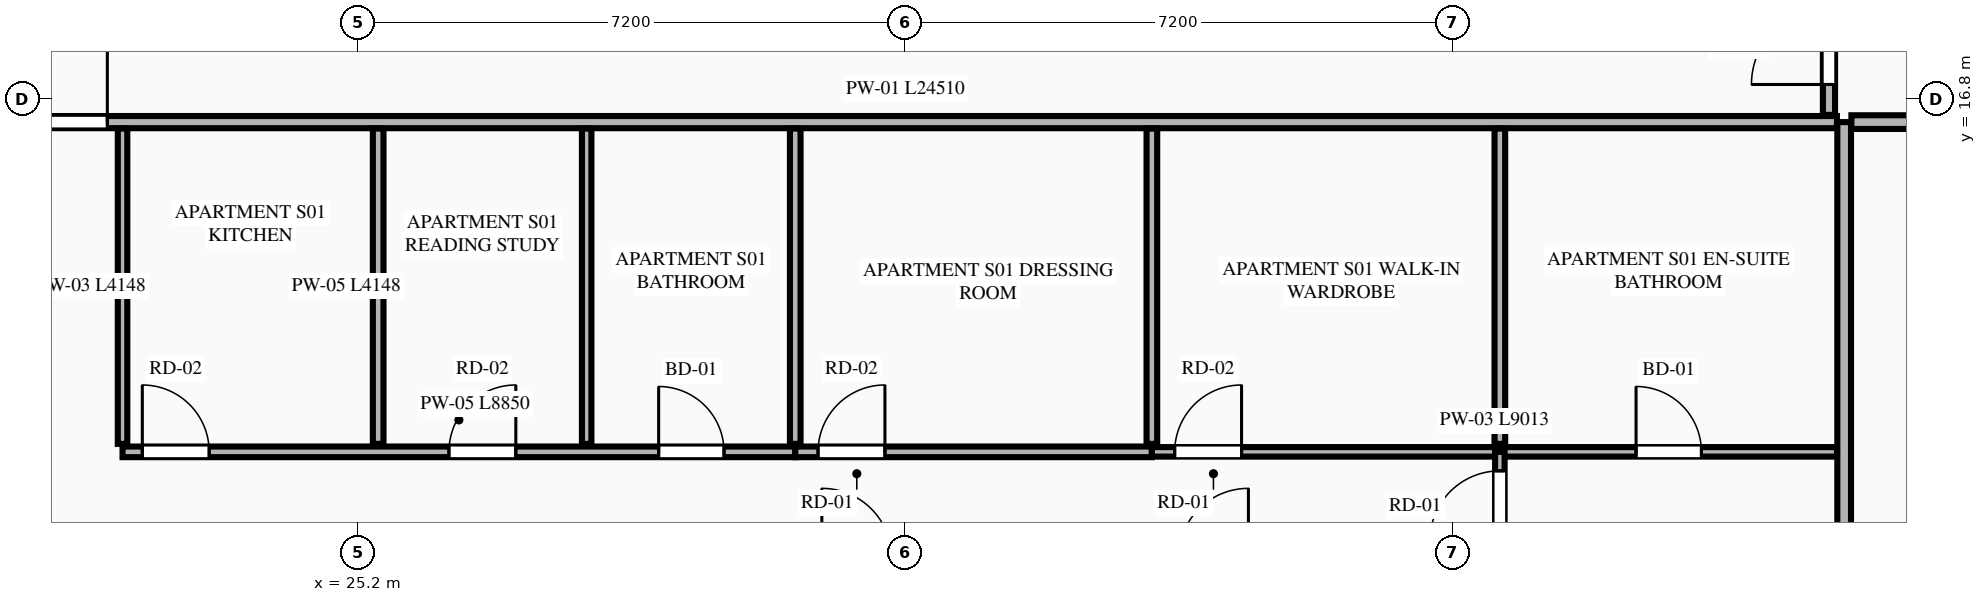
"""IFC4 building model, lengths in metres.
Left out: names, types, materials, properties, quantities, classifications, styles, units other than length and angle.
Written with IfcOpenShell. Run it as: python <this file> out.ifc"""

import sys

from ifc_helpers import new_model, si_unit, direction, frame, frame_2d, origin, place, context, subcontext, project, spatial, rectangle, extrude, element, fill, save


model = new_model("IFC4")
c1 = context("Model", 3, precision=1e-05, world=origin(), true_north=direction((0.0, 1.0)))
c2 = subcontext(c1, "Body", "Model", "MODEL_VIEW")
j1 = project(units=[si_unit("LENGTHUNIT", "METRE"), si_unit("PLANEANGLEUNIT", "RADIAN")], contexts=[c1])
p1 = place(None, origin())
s1 = spatial("IfcSite", under=j1, at=p1, CompositionType="ELEMENT")
p2 = place(p1, origin())
s2 = spatial("IfcBuilding", under=s1, at=p2, CompositionType="ELEMENT")
p3 = place(p2, frame((0.0, 0.0, 141.0)))
s3 = spatial("IfcBuildingStorey", under=s2, at=p3, CompositionType="ELEMENT", Elevation=141.0)
p4 = place(p3, frame((44.75, 4.105, 0.0), z_axis=(0.0, 0.0, 1.0), x_axis=(0.0, 1.0, 0.0)))
e1 = element("IfcWall", 1, at=p4, inside=s3, PredefinedType="PARTITIONING", context=c2, shape_type="SweptSolid", body=[
    extrude(rectangle(XDim=12.395, YDim=0.18, at=frame_2d((6.198, 0.0))), origin(), (0.0, 0.0, 1.0), 3.34),
])
p5 = place(p3, frame((20.145, 16.5, 0.0), z_axis=(0.0, 0.0, 1.0), x_axis=(1.0, 0.0, 0.0)))
e2 = element("IfcWall", 2, at=p5, inside=s3, PredefinedType="PARTITIONING", context=c2, shape_type="SweptSolid", body=[
    extrude(rectangle(XDim=24.51, YDim=0.16, at=frame_2d((12.255, 0.0))), origin(), (0.0, 0.0, 1.0), 3.34),
])
p6 = place(p5, frame((0.405, 0.0, 0.0)))
e3 = element("IfcOpeningElement", 3, at=p6, cuts=e2, PredefinedType="OPENING", context=c2, shape_type="SweptSolid", body=[
    extrude(rectangle(XDim=1.35, YDim=2.35, at=frame_2d((0.675, 1.175))), frame((0.0, 0.09, 0.0), z_axis=(0.0, -1.0, 0.0), x_axis=(1.0, 0.0, 0.0)), (0.0, 0.0, 1.0), 0.18),
])
p7 = place(p3, frame((22.1, 12.267, 0.0), z_axis=(0.0, 0.0, 1.0), x_axis=(0.0, 1.0, 0.0)))
e4 = element("IfcWall", 4, at=p7, inside=s3, PredefinedType="PARTITIONING", context=c2, shape_type="SweptSolid", body=[
    extrude(rectangle(XDim=4.148, YDim=0.125, at=frame_2d((2.074, 0.0))), origin(), (0.0, 0.0, 1.0), 2.722),
])
p8 = place(p3, frame((22.1, 12.162, 0.0), z_axis=(0.0, 0.0, 1.0), x_axis=(1.0, 0.0, 0.0)))
e5 = element("IfcWall", 5, at=p8, inside=s3, PredefinedType="PLUMBINGWALL", context=c2, shape_type="SweptSolid", body=[
    extrude(rectangle(XDim=8.85, YDim=0.14, at=frame_2d((4.425, 0.0))), origin(), (0.0, 0.0, 1.0), 3.34),
])
p9 = place(p8, frame((7.053, 0.0, 0.0)))
e6 = element("IfcOpeningElement", 6, at=p9, cuts=e5, PredefinedType="OPENING", context=c2, shape_type="SweptSolid", body=[
    extrude(rectangle(XDim=0.86, YDim=2.1, at=frame_2d((0.43, 1.05))), frame((0.0, 0.08, 0.0), z_axis=(0.0, -1.0, 0.0), x_axis=(1.0, 0.0, 0.0)), (0.0, 0.0, 1.0), 0.16),
])
p10 = place(p8, frame((0.26, 0.0, 0.0)))
e7 = element("IfcOpeningElement", 7, at=p10, cuts=e5, PredefinedType="OPENING", context=c2, shape_type="SweptSolid", body=[
    extrude(rectangle(XDim=0.88, YDim=2.15, at=frame_2d((0.44, 1.075))), frame((0.0, 0.08, 0.0), z_axis=(0.0, -1.0, 0.0), x_axis=(1.0, 0.0, 0.0)), (0.0, 0.0, 1.0), 0.16),
])
p11 = place(p8, frame((4.294, 0.0, 0.0)))
e8 = element("IfcOpeningElement", 8, at=p11, cuts=e5, PredefinedType="OPENING", context=c2, shape_type="SweptSolid", body=[
    extrude(rectangle(XDim=0.88, YDim=2.15, at=frame_2d((0.44, 1.075))), frame((0.0, 0.08, 0.0), z_axis=(0.0, -1.0, 0.0), x_axis=(1.0, 0.0, 0.0)), (0.0, 0.0, 1.0), 0.16),
])
p12 = place(p3, frame((30.95, 12.162, 0.0), z_axis=(0.0, 0.0, 1.0), x_axis=(1.0, 0.0, 0.0)))
e9 = element("IfcWall", 9, at=p12, inside=s3, PredefinedType="PLUMBINGWALL", context=c2, shape_type="SweptSolid", body=[
    extrude(rectangle(XDim=4.692, YDim=0.14, at=frame_2d((2.346, 0.0))), origin(), (0.0, 0.0, 1.0), 3.34),
])
p13 = place(p12, frame((0.3, 0.0, 0.0)))
e10 = element("IfcOpeningElement", 10, at=p13, cuts=e9, PredefinedType="OPENING", context=c2, shape_type="SweptSolid", body=[
    extrude(rectangle(XDim=0.88, YDim=2.15, at=frame_2d((0.44, 1.075))), frame((0.0, 0.08, 0.0), z_axis=(0.0, -1.0, 0.0), x_axis=(1.0, 0.0, 0.0)), (0.0, 0.0, 1.0), 0.16),
])
p14 = place(p3, frame((35.642, 12.162, 0.0), z_axis=(0.0, 0.0, 1.0), x_axis=(1.0, 0.0, 0.0)))
e11 = element("IfcWall", 11, at=p14, inside=s3, PredefinedType="PARTITIONING", context=c2, shape_type="SweptSolid", body=[
    extrude(rectangle(XDim=9.013, YDim=0.125, at=frame_2d((4.506, 0.0))), origin(), (0.0, 0.0, 1.0), 3.34),
])
p15 = place(p14, frame((6.37, 0.0, 0.0)))
e12 = element("IfcOpeningElement", 12, at=p15, cuts=e11, PredefinedType="OPENING", context=c2, shape_type="SweptSolid", body=[
    extrude(rectangle(XDim=0.86, YDim=2.1, at=frame_2d((0.43, 1.05))), frame((0.0, 0.073, 0.0), z_axis=(0.0, -1.0, 0.0), x_axis=(1.0, 0.0, 0.0)), (0.0, 0.0, 1.0), 0.145),
])
p16 = place(p14, frame((0.3, 0.0, 0.0)))
e13 = element("IfcOpeningElement", 13, at=p16, cuts=e11, PredefinedType="OPENING", context=c2, shape_type="SweptSolid", body=[
    extrude(rectangle(XDim=0.88, YDim=2.15, at=frame_2d((0.44, 1.075))), frame((0.0, 0.073, 0.0), z_axis=(0.0, -1.0, 0.0), x_axis=(1.0, 0.0, 0.0)), (0.0, 0.0, 1.0), 0.145),
])
p17 = place(p3, frame((25.463, 12.267, 0.0), z_axis=(0.0, 0.0, 1.0), x_axis=(0.0, 1.0, 0.0)))
e14 = element("IfcWall", 14, at=p17, inside=s3, PredefinedType="PLUMBINGWALL", context=c2, shape_type="SweptSolid", body=[
    extrude(rectangle(XDim=4.148, YDim=0.14, at=frame_2d((2.074, 0.0))), origin(), (0.0, 0.0, 1.0), 3.34),
])
p18 = place(p3, frame((28.206, 12.267, 0.0), z_axis=(0.0, 0.0, 1.0), x_axis=(0.0, 1.0, 0.0)))
e15 = element("IfcWall", 15, at=p18, inside=s3, PredefinedType="PARTITIONING", context=c2, shape_type="SweptSolid", body=[
    extrude(rectangle(XDim=4.148, YDim=0.125, at=frame_2d((2.074, 0.0))), origin(), (0.0, 0.0, 1.0), 3.34),
])
p19 = place(p3, frame((40.22, 10.832, 0.0), z_axis=(0.0, 0.0, 1.0), x_axis=(0.0, 1.0, 0.0)))
e16 = element("IfcWall", 16, at=p19, inside=s3, PredefinedType="PARTITIONING", context=c2, shape_type="SweptSolid", body=[
    extrude(rectangle(XDim=1.33, YDim=0.125, at=frame_2d((0.665, 0.0))), origin(), (0.0, 0.0, 1.0), 3.34),
])
p20 = place(p19, frame((0.16, 0.0, 0.0)))
e17 = element("IfcOpeningElement", 17, at=p20, cuts=e16, PredefinedType="OPENING", context=c2, shape_type="SweptSolid", body=[
    extrude(rectangle(XDim=0.92, YDim=2.15, at=frame_2d((0.46, 1.075))), frame((0.0, 0.073, 0.0), z_axis=(0.0, -1.0, 0.0), x_axis=(1.0, 0.0, 0.0)), (0.0, 0.0, 1.0), 0.145),
])
for number, where, z_axis, x_axis in (
    (18, (30.95, 12.267, 0.0), (0.0, 0.0, 1.0), (0.0, 1.0, 0.0)),
    (19, (35.642, 12.267, 0.0), (0.0, 0.0, 1.0), (0.0, 1.0, 0.0)),
    (20, (40.22, 12.267, 0.0), (0.0, 0.0, 1.0), (0.0, 1.0, 0.0)),
):
    element("IfcWall", number, at=place(p3, frame(where, z_axis=z_axis, x_axis=x_axis)), inside=s3, PredefinedType="PLUMBINGWALL", context=c2, shape_type="SweptSolid", body=[
        extrude(rectangle(XDim=4.148, YDim=0.14, at=frame_2d((2.074, 0.0))), origin(), (0.0, 0.0, 1.0), 3.34),
    ])
p21 = place(p3, frame((44.845, 16.5, 0.0), z_axis=(0.0, 0.0, 1.0), x_axis=(1.0, 0.0, 0.0)))
e21 = element("IfcWall", 21, at=p21, inside=s3, PredefinedType="PARTITIONING", context=c2, shape_type="SweptSolid", body=[
    extrude(rectangle(XDim=7.77, YDim=0.18, at=frame_2d((3.885, 0.0))), origin(), (0.0, 0.0, 1.0), 3.34),
])
p22 = place(p3, frame((44.55, 16.595, 0.0), z_axis=(0.0, 0.0, 1.0), x_axis=(0.0, 1.0, 0.0)))
e22 = element("IfcWall", 22, at=p22, inside=s3, PredefinedType="PARTITIONING", context=c2, shape_type="SweptSolid", body=[
    extrude(rectangle(XDim=10.714, YDim=0.16, at=frame_2d((5.357, 0.0))), origin(), (0.0, 0.0, 1.0), 3.34),
])
p23 = place(p22, frame((0.4, 0.0, 0.0)))
e23 = element("IfcOpeningElement", 23, at=p23, cuts=e22, PredefinedType="OPENING", context=c2, shape_type="SweptSolid", body=[
    extrude(rectangle(XDim=1.02, YDim=2.25, at=frame_2d((0.51, 1.125))), frame((0.0, 0.09, 0.0), z_axis=(0.0, -1.0, 0.0), x_axis=(1.0, 0.0, 0.0)), (0.0, 0.0, 1.0), 0.18),
])
p24 = place(p9, origin())
e24 = element("IfcDoor", 24, at=p24, inside=s3, OperationType="SINGLE_SWING_LEFT", PredefinedType="DOOR", context=c2, shape_type="SweptSolid", body=[
    extrude(rectangle(XDim=0.86, YDim=2.1, at=frame_2d((0.43, 1.05))), frame((0.0, 0.025, 0.0), z_axis=(0.0, -1.0, 0.0), x_axis=(1.0, 0.0, 0.0)), (0.0, 0.0, 1.0), 0.05),
])
fill(e6, e24)
p25 = place(p15, origin())
e25 = element("IfcDoor", 25, at=p25, inside=s3, OperationType="SINGLE_SWING_LEFT", PredefinedType="DOOR", context=c2, shape_type="SweptSolid", body=[
    extrude(rectangle(XDim=0.86, YDim=2.1, at=frame_2d((0.43, 1.05))), frame((0.0, 0.025, 0.0), z_axis=(0.0, -1.0, 0.0), x_axis=(1.0, 0.0, 0.0)), (0.0, 0.0, 1.0), 0.05),
])
fill(e12, e25)
p26 = place(p6, origin())
e26 = element("IfcDoor", 26, at=p26, inside=s3, OperationType="SINGLE_SWING_RIGHT", PredefinedType="DOOR", context=c2, shape_type="SweptSolid", body=[
    extrude(rectangle(XDim=1.35, YDim=2.35, at=frame_2d((0.675, 1.175))), frame((0.0, 0.025, 0.0), z_axis=(0.0, -1.0, 0.0), x_axis=(1.0, 0.0, 0.0)), (0.0, 0.0, 1.0), 0.05),
])
fill(e3, e26)
p27 = place(p10, origin())
e27 = element("IfcDoor", 27, at=p27, inside=s3, OperationType="SINGLE_SWING_LEFT", PredefinedType="DOOR", context=c2, shape_type="SweptSolid", body=[
    extrude(rectangle(XDim=0.88, YDim=2.15, at=frame_2d((0.44, 1.075))), frame((0.0, 0.025, 0.0), z_axis=(0.0, -1.0, 0.0), x_axis=(1.0, 0.0, 0.0)), (0.0, 0.0, 1.0), 0.05),
])
fill(e7, e27)
p28 = place(p11, origin())
e28 = element("IfcDoor", 28, at=p28, inside=s3, OperationType="SINGLE_SWING_RIGHT", PredefinedType="DOOR", context=c2, shape_type="SweptSolid", body=[
    extrude(rectangle(XDim=0.88, YDim=2.15, at=frame_2d((0.44, 1.075))), frame((0.0, 0.025, 0.0), z_axis=(0.0, -1.0, 0.0), x_axis=(1.0, 0.0, 0.0)), (0.0, 0.0, 1.0), 0.05),
])
fill(e8, e28)
p29 = place(p13, origin())
e29 = element("IfcDoor", 29, at=p29, inside=s3, OperationType="SINGLE_SWING_RIGHT", PredefinedType="DOOR", context=c2, shape_type="SweptSolid", body=[
    extrude(rectangle(XDim=0.88, YDim=2.15, at=frame_2d((0.44, 1.075))), frame((0.0, 0.025, 0.0), z_axis=(0.0, -1.0, 0.0), x_axis=(1.0, 0.0, 0.0)), (0.0, 0.0, 1.0), 0.05),
])
fill(e10, e29)
p30 = place(p20, origin())
e30 = element("IfcDoor", 30, at=p30, inside=s3, OperationType="SINGLE_SWING_LEFT", PredefinedType="DOOR", context=c2, shape_type="SweptSolid", body=[
    extrude(rectangle(XDim=0.92, YDim=2.15, at=frame_2d((0.46, 1.075))), frame((0.0, 0.025, 0.0), z_axis=(0.0, -1.0, 0.0), x_axis=(1.0, 0.0, 0.0)), (0.0, 0.0, 1.0), 0.05),
])
fill(e17, e30)
p31 = place(p16, origin())
e31 = element("IfcDoor", 31, at=p31, inside=s3, OperationType="SINGLE_SWING_RIGHT", PredefinedType="DOOR", context=c2, shape_type="SweptSolid", body=[
    extrude(rectangle(XDim=0.88, YDim=2.15, at=frame_2d((0.44, 1.075))), frame((0.0, 0.025, 0.0), z_axis=(0.0, -1.0, 0.0), x_axis=(1.0, 0.0, 0.0)), (0.0, 0.0, 1.0), 0.05),
])
fill(e13, e31)
p32 = place(p23, origin())
e32 = element("IfcDoor", 32, at=p32, inside=s3, OperationType="SINGLE_SWING_LEFT", PredefinedType="DOOR", context=c2, shape_type="SweptSolid", body=[
    extrude(rectangle(XDim=1.02, YDim=2.25, at=frame_2d((0.51, 1.125))), frame((0.0, 0.025, 0.0), z_axis=(0.0, -1.0, 0.0), x_axis=(1.0, 0.0, 0.0)), (0.0, 0.0, 1.0), 0.05),
])
fill(e23, e32)
save(model, sys.argv[1])
